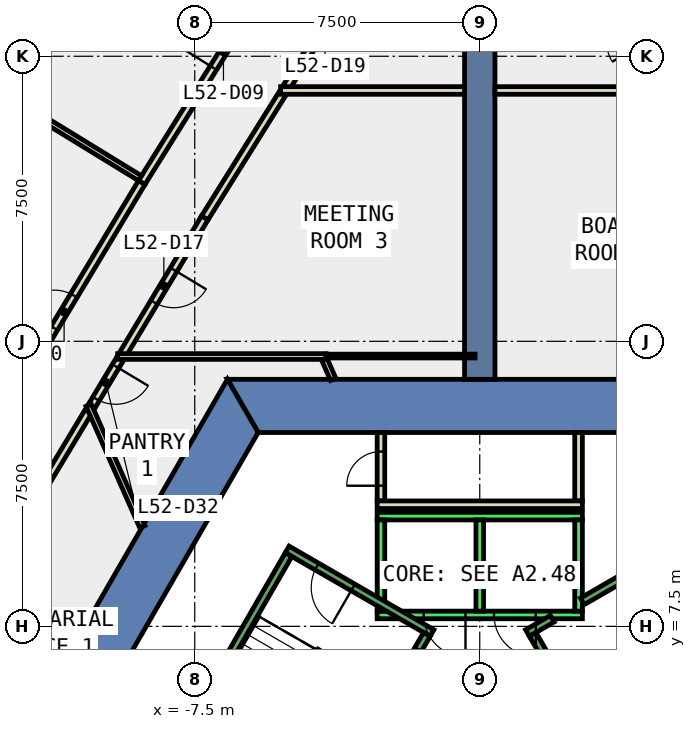
"""IFC4 building model, lengths in metres.
Left out: names, types, materials, properties, quantities, classifications, styles, units other than length and angle.
Written with IfcOpenShell. Run it as: python <this file> out.ifc"""

import sys

from ifc_helpers import new_model, si_unit, direction, frame, frame_2d, origin, place, context, subcontext, project, spatial, polyline, rectangle, outline, extrude, element, fill, save


model = new_model("IFC4")
c1 = context("Model", 3, precision=1e-05, world=origin(), true_north=direction((0.0, 1.0)))
c2 = subcontext(c1, "Body", "Model", "MODEL_VIEW")
j1 = project(units=[si_unit("LENGTHUNIT", "METRE"), si_unit("PLANEANGLEUNIT", "RADIAN")], contexts=[c1])
p1 = place(None, origin())
s1 = spatial("IfcSite", under=j1, at=p1, CompositionType="ELEMENT")
p2 = place(p1, origin())
s2 = spatial("IfcBuilding", under=s1, at=p2, CompositionType="ELEMENT")
p3 = place(p2, frame((0.0, 0.0, 231.8)))
s3 = spatial("IfcBuildingStorey", under=s2, at=p3, CompositionType="ELEMENT", Elevation=231.8)
p4 = place(p3, frame((0.0, 0.0, -0.4)))
e1 = element("IfcWall", 1, at=p4, inside=s3, PredefinedType="SHEAR", context=c2, shape_type="SweptSolid", body=[
    extrude(outline(polyline([(6.64, 14.0), (-6.64, 14.0), (-5.831, 12.6), (5.831, 12.6), (6.64, 14.0)])), origin(), (0.0, 0.0, 1.0), 4.0),
])
p5 = place(p3, frame((0.0, 0.0, -0.4)))
e2 = element("IfcWall", 2, at=p5, inside=s3, PredefinedType="SHEAR", context=c2, shape_type="SweptSolid", body=[
    extrude(outline(polyline([(-11.834, 5.002), (-10.622, 4.302), (-5.831, 12.6), (-6.64, 14.0), (-11.834, 5.002)])), origin(), (0.0, 0.0, 1.0), 4.0),
])
p6 = place(p3, frame((0.0, 14.0, -0.4), z_axis=(0.0, 0.0, 1.0), x_axis=(0.0, 1.0, 0.0)))
e3 = element("IfcWall", 3, at=p6, inside=s3, PredefinedType="SHEAR", context=c2, shape_type="SweptSolid", body=[
    extrude(rectangle(XDim=9.0, YDim=0.8, at=frame_2d((4.5, 0.0))), origin(), (0.0, 0.0, 1.0), 4.0),
])
p7 = place(p3, frame((-9.485, 28.893, 0.0), z_axis=(0.0, 0.0, 1.0), x_axis=(-0.530037467052, -0.847974223383, 0.0)))
e4 = element("IfcWall", 4, at=p7, inside=s3, PredefinedType="STANDARD", context=c2, shape_type="SweptSolid", body=[
    extrude(rectangle(XDim=7.405, YDim=0.3, at=frame_2d((3.702, 0.0))), origin(), (0.0, 0.0, 1.0), 3.6),
])
p8 = place(p7, frame((0.651, 0.0, 0.9)))
e5 = element("IfcOpeningElement", 5, at=p8, cuts=e4, PredefinedType="OPENING", context=c2, shape_type="SweptSolid", body=[
    extrude(rectangle(XDim=2.4, YDim=2.6, at=frame_2d((1.2, 1.3))), frame((0.0, 0.16, 0.0), z_axis=(0.0, -1.0, 0.0), x_axis=(1.0, 0.0, 0.0)), (0.0, 0.0, 1.0), 0.32),
])
p9 = place(p7, frame((4.354, 0.0, 0.9)))
e6 = element("IfcOpeningElement", 6, at=p9, cuts=e4, PredefinedType="OPENING", context=c2, shape_type="SweptSolid", body=[
    extrude(rectangle(XDim=2.4, YDim=2.6, at=frame_2d((1.2, 1.3))), frame((0.0, 0.16, 0.0), z_axis=(0.0, -1.0, 0.0), x_axis=(1.0, 0.0, 0.0)), (0.0, 0.0, 1.0), 0.32),
])
p10 = place(p3, frame((-9.466, 14.536, 0.0), z_axis=(0.0, 0.0, 1.0), x_axis=(-0.514545292, -0.857463201823, 0.0)))
e7 = element("IfcWall", 7, at=p10, inside=s3, PredefinedType="PARTITIONING", context=c2, shape_type="SweptSolid", body=[
    extrude(rectangle(XDim=1.449, YDim=0.2, at=frame_2d((0.725, 0.0))), origin(), (0.0, 0.0, 1.0), 3.6),
])
p11 = place(p10, frame((0.225, 0.0, 0.0)))
e8 = element("IfcOpeningElement", 8, at=p11, cuts=e7, PredefinedType="OPENING", context=c2, shape_type="SweptSolid", body=[
    extrude(rectangle(XDim=1.0, YDim=2.1, at=frame_2d((0.5, 1.05))), frame((0.0, 0.11, 0.0), z_axis=(0.0, -1.0, 0.0), x_axis=(1.0, 0.0, 0.0)), (0.0, 0.0, 1.0), 0.22),
])
p12 = place(p3, frame((-10.29, 13.164, 0.0), z_axis=(0.0, 0.0, 1.0), x_axis=(-0.514904735811, -0.857247404802, 0.0)))
e9 = element("IfcWall", 9, at=p12, inside=s3, PredefinedType="PARTITIONING", context=c2, shape_type="SweptSolid", body=[
    extrude(rectangle(XDim=2.194, YDim=0.2, at=frame_2d((1.097, 0.0))), origin(), (0.0, 0.0, 1.0), 3.6),
])
p13 = place(p3, frame((-5.193, 21.515, 0.0), z_axis=(0.0, 0.0, 1.0), x_axis=(-0.530175390862, -0.847887996686, 0.0)))
e10 = element("IfcWall", 10, at=p13, inside=s3, PredefinedType="PARTITIONING", context=c2, shape_type="SweptSolid", body=[
    extrude(rectangle(XDim=3.855, YDim=0.2, at=frame_2d((1.928, 0.0))), origin(), (0.0, 0.0, 1.0), 3.6),
])
p14 = place(p3, frame((-7.237, 18.246, 0.0), z_axis=(0.0, 0.0, 1.0), x_axis=(-0.514959644878, -0.857214421336, 0.0)))
e11 = element("IfcWall", 11, at=p14, inside=s3, PredefinedType="PARTITIONING", context=c2, shape_type="SweptSolid", body=[
    extrude(rectangle(XDim=4.179, YDim=0.2, at=frame_2d((2.089, 0.0))), origin(), (0.0, 0.0, 1.0), 3.6),
])
p15 = place(p14, frame((1.589, 0.0, 0.0)))
e12 = element("IfcOpeningElement", 12, at=p15, cuts=e11, PredefinedType="OPENING", context=c2, shape_type="SweptSolid", body=[
    extrude(rectangle(XDim=1.0, YDim=2.1, at=frame_2d((0.5, 1.05))), frame((0.0, 0.11, 0.0), z_axis=(0.0, -1.0, 0.0), x_axis=(1.0, 0.0, 0.0)), (0.0, 0.0, 1.0), 0.22),
])
p16 = place(p3, frame((5.087, 21.685, 0.0), z_axis=(0.0, 0.0, 1.0), x_axis=(-0.529998940003, 0.847998304005, 0.0)))
e13 = element("IfcWall", 13, at=p16, inside=s3, PredefinedType="PARTITIONING", context=c2, shape_type="SweptSolid", body=[
    extrude(rectangle(XDim=3.83, YDim=0.2, at=frame_2d((1.915, 0.0))), origin(), (0.0, 0.0, 1.0), 3.6),
])
p17 = place(p16, frame((1.416, 0.0, 0.0)))
e14 = element("IfcOpeningElement", 14, at=p17, cuts=e13, PredefinedType="OPENING", context=c2, shape_type="SweptSolid", body=[
    extrude(rectangle(XDim=1.0, YDim=2.1, at=frame_2d((0.5, 1.05))), frame((0.0, 0.11, 0.0), z_axis=(0.0, -1.0, 0.0), x_axis=(1.0, 0.0, 0.0)), (0.0, 0.0, 1.0), 0.22),
])
p18 = place(p3, frame((-3.057, 24.933, 0.0), z_axis=(0.0, 0.0, 1.0), x_axis=(-0.529998940003, -0.847998304005, 0.0)))
e15 = element("IfcWall", 15, at=p18, inside=s3, PredefinedType="PARTITIONING", context=c2, shape_type="SweptSolid", body=[
    extrude(rectangle(XDim=3.83, YDim=0.2, at=frame_2d((1.915, 0.0))), origin(), (0.0, 0.0, 1.0), 3.6),
])
p19 = place(p18, frame((1.416, 0.0, 0.0)))
e16 = element("IfcOpeningElement", 16, at=p19, cuts=e15, PredefinedType="OPENING", context=c2, shape_type="SweptSolid", body=[
    extrude(rectangle(XDim=1.0, YDim=2.1, at=frame_2d((0.5, 1.05))), frame((0.0, 0.11, 0.0), z_axis=(0.0, -1.0, 0.0), x_axis=(1.0, 0.0, 0.0)), (0.0, 0.0, 1.0), 0.22),
])
p20 = place(p3, frame((-8.896, 19.176, 0.0), z_axis=(0.0, 0.0, 1.0), x_axis=(0.529985425286, 0.848006750553, 0.0)))
e17 = element("IfcWall", 17, at=p20, inside=s3, PredefinedType="PARTITIONING", context=c2, shape_type="SweptSolid", body=[
    extrude(rectangle(XDim=8.119, YDim=0.2, at=frame_2d((4.06, 0.0))), origin(), (0.0, 0.0, 1.0), 3.6),
])
p21 = place(p20, frame((3.56, 0.0, 0.0)))
e18 = element("IfcOpeningElement", 18, at=p21, cuts=e17, PredefinedType="OPENING", context=c2, shape_type="SweptSolid", body=[
    extrude(rectangle(XDim=1.0, YDim=2.1, at=frame_2d((0.5, 1.05))), frame((0.0, 0.11, 0.0), z_axis=(0.0, -1.0, 0.0), x_axis=(1.0, 0.0, 0.0)), (0.0, 0.0, 1.0), 0.22),
])
p22 = place(p3, frame((-13.057, 12.247, 0.0), z_axis=(0.0, 0.0, 1.0), x_axis=(0.51490435266, 0.857247634941, 0.0)))
e19 = element("IfcWall", 19, at=p22, inside=s3, PredefinedType="PARTITIONING", context=c2, shape_type="SweptSolid", body=[
    extrude(rectangle(XDim=8.083, YDim=0.2, at=frame_2d((4.042, 0.0))), origin(), (0.0, 0.0, 1.0), 3.6),
])
p23 = place(p22, frame((3.616, 0.0, 0.0)))
e20 = element("IfcOpeningElement", 20, at=p23, cuts=e19, PredefinedType="OPENING", context=c2, shape_type="SweptSolid", body=[
    extrude(rectangle(XDim=1.0, YDim=2.1, at=frame_2d((0.5, 1.05))), frame((0.0, 0.11, 0.0), z_axis=(0.0, -1.0, 0.0), x_axis=(1.0, 0.0, 0.0)), (0.0, 0.0, 1.0), 0.22),
])
p24 = place(p3, frame((-2.6, 10.8, 0.0), z_axis=(0.0, 0.0, 1.0), x_axis=(0.0, 1.0, 0.0)))
e21 = element("IfcWall", 21, at=p24, inside=s3, PredefinedType="PARTITIONING", context=c2, shape_type="SweptSolid", body=[
    extrude(rectangle(XDim=1.8, YDim=0.2, at=frame_2d((0.9, 0.0))), origin(), (0.0, 0.0, 1.0), 3.6),
])
p25 = place(p24, frame((0.4, 0.0, 0.0)))
e22 = element("IfcOpeningElement", 22, at=p25, cuts=e21, PredefinedType="OPENING", context=c2, shape_type="SweptSolid", body=[
    extrude(rectangle(XDim=0.9, YDim=2.1, at=frame_2d((0.45, 1.05))), frame((0.0, 0.11, 0.0), z_axis=(0.0, -1.0, 0.0), x_axis=(1.0, 0.0, 0.0)), (0.0, 0.0, 1.0), 0.22),
])
p26 = place(p3, frame((2.6, 12.6, 0.0), z_axis=(0.0, 0.0, 1.0), x_axis=(0.0, -1.0, 0.0)))
e23 = element("IfcWall", 23, at=p26, inside=s3, PredefinedType="PARTITIONING", context=c2, shape_type="SweptSolid", body=[
    extrude(rectangle(XDim=1.8, YDim=0.2, at=frame_2d((0.9, 0.0))), origin(), (0.0, 0.0, 1.0), 3.6),
])
p27 = place(p3, frame((2.7, 10.7, 0.0), z_axis=(0.0, 0.0, 1.0), x_axis=(-1.0, 0.0, 0.0)))
e24 = element("IfcWall", 24, at=p27, inside=s3, PredefinedType="PARTITIONING", context=c2, shape_type="SweptSolid", body=[
    extrude(rectangle(XDim=5.4, YDim=0.2, at=frame_2d((2.7, 0.0))), origin(), (0.0, 0.0, 1.0), 3.6),
])
p28 = place(p3, frame((-8.879, 10.123, 0.0), z_axis=(0.0, 0.0, 1.0), x_axis=(-0.404271206787, 0.914639159102, 0.0)))
e25 = element("IfcWall", 25, at=p28, inside=s3, PredefinedType="PARTITIONING", context=c2, shape_type="SweptSolid", body=[
    extrude(rectangle(XDim=3.495, YDim=0.15, at=frame_2d((1.748, 0.0))), origin(), (0.0, 0.0, 1.0), 3.6),
])
p29 = place(p3, frame((-3.857, 14.0, 0.0), z_axis=(0.0, 0.0, 1.0), x_axis=(-0.403443407317, 0.915004599493, 0.0)))
e26 = element("IfcWall", 26, at=p29, inside=s3, PredefinedType="PARTITIONING", context=c2, shape_type="SweptSolid", body=[
    extrude(rectangle(XDim=0.58, YDim=0.15, at=frame_2d((0.29, 0.0))), origin(), (0.0, 0.0, 1.0), 3.6),
])
p30 = place(p3, frame((-4.047, 14.6, 0.0), z_axis=(0.0, 0.0, 1.0), x_axis=(-1.0, 0.0, 0.0)))
e27 = element("IfcWall", 27, at=p30, inside=s3, PredefinedType="PARTITIONING", context=c2, shape_type="SweptSolid", body=[
    extrude(rectangle(XDim=5.48, YDim=0.15, at=frame_2d((2.74, 0.0))), origin(), (0.0, 0.0, 1.0), 3.6),
])
p31 = place(p3, frame((-4.047, 14.612, 0.0), z_axis=(0.0, 0.0, 1.0), x_axis=(1.0, 0.0, 0.0)))
e28 = element("IfcWall", 28, at=p31, inside=s3, PredefinedType="PARTITIONING", context=c2, shape_type="SweptSolid", body=[
    extrude(rectangle(XDim=3.924, YDim=0.1, at=frame_2d((1.962, 0.0))), origin(), (0.0, 0.0, 1.0), 3.6),
])
for number, where, z_axis, x_axis in (
    (29, (0.4, 21.6, 0.0), (0.0, 0.0, 1.0), (1.0, 0.0, 0.0)),
    (30, (-5.24, 21.6, 0.0), (0.0, 0.0, 1.0), (1.0, 0.0, 0.0)),
):
    element("IfcWall", number, at=place(p3, frame(where, z_axis=z_axis, x_axis=x_axis)), inside=s3, PredefinedType="PARTITIONING", context=c2, shape_type="SweptSolid", body=[
        extrude(rectangle(XDim=4.84, YDim=0.2, at=frame_2d((2.42, 0.0))), origin(), (0.0, 0.0, 1.0), 3.6),
    ])
p32 = place(p3, frame((-8.942, 19.292, 0.0), z_axis=(0.0, 0.0, 1.0), x_axis=(-0.85273109234, 0.522350154739, 0.0)))
e31 = element("IfcWall", 31, at=p32, inside=s3, PredefinedType="PARTITIONING", context=c2, shape_type="SweptSolid", body=[
    extrude(rectangle(XDim=4.08, YDim=0.15, at=frame_2d((2.04, 0.0))), origin(), (0.0, 0.0, 1.0), 3.6),
])
p33 = place(p3, frame((2.7, 7.8, 0.0), z_axis=(0.0, 0.0, 1.0), x_axis=(-1.0, 0.0, 0.0)))
e32 = element("IfcWall", 32, at=p33, inside=s3, PredefinedType="STANDARD", context=c2, shape_type="SweptSolid", body=[
    extrude(rectangle(XDim=5.4, YDim=0.2, at=frame_2d((2.7, 0.0))), origin(), (0.0, 0.0, 1.0), 3.6),
])
p34 = place(p33, frame((1.225, 0.0, 0.0)))
e33 = element("IfcOpeningElement", 33, at=p34, cuts=e32, PredefinedType="OPENING", context=c2, shape_type="SweptSolid", body=[
    extrude(rectangle(XDim=1.1, YDim=2.1, at=frame_2d((0.55, 1.05))), frame((0.0, 0.11, 0.0), z_axis=(0.0, -1.0, 0.0), x_axis=(1.0, 0.0, 0.0)), (0.0, 0.0, 1.0), 0.22),
])
p35 = place(p33, frame((3.075, 0.0, 0.0)))
e34 = element("IfcOpeningElement", 34, at=p35, cuts=e32, PredefinedType="OPENING", context=c2, shape_type="SweptSolid", body=[
    extrude(rectangle(XDim=1.1, YDim=2.1, at=frame_2d((0.55, 1.05))), frame((0.0, 0.11, 0.0), z_axis=(0.0, -1.0, 0.0), x_axis=(1.0, 0.0, 0.0)), (0.0, 0.0, 1.0), 0.22),
])
p36 = place(p3, frame((2.7, 10.4, 0.0), z_axis=(0.0, 0.0, 1.0), x_axis=(-1.0, 0.0, 0.0)))
e35 = element("IfcWall", 35, at=p36, inside=s3, PredefinedType="STANDARD", context=c2, shape_type="SweptSolid", body=[
    extrude(rectangle(XDim=5.4, YDim=0.2, at=frame_2d((2.7, 0.0))), origin(), (0.0, 0.0, 1.0), 3.6),
])
for number, where, z_axis, x_axis in (
    (36, (2.6, 7.9, 0.0), (0.0, 0.0, 1.0), (0.0, 1.0, 0.0)),
    (37, (0.0, 7.9, 0.0), (0.0, 0.0, 1.0), (0.0, 1.0, 0.0)),
    (38, (-2.6, 7.9, 0.0), (0.0, 0.0, 1.0), (0.0, 1.0, 0.0)),
):
    element("IfcWall", number, at=place(p3, frame(where, z_axis=z_axis, x_axis=x_axis)), inside=s3, PredefinedType="STANDARD", context=c2, shape_type="SweptSolid", body=[
        extrude(rectangle(XDim=2.4, YDim=0.2, at=frame_2d((1.2, 0.0))), origin(), (0.0, 0.0, 1.0), 3.6),
    ])
p37 = place(p3, frame((2.7, 8.158, 0.0), z_axis=(0.0, 0.0, 1.0), x_axis=(0.86611865017, 0.499838457731, 0.0)))
e39 = element("IfcWall", 39, at=p37, inside=s3, PredefinedType="STANDARD", context=c2, shape_type="SweptSolid", body=[
    extrude(rectangle(XDim=2.733, YDim=0.2, at=frame_2d((1.366, 0.0))), origin(), (0.0, 0.0, 1.0), 3.6),
])
p38 = place(p3, frame((1.256, 7.324, 0.0), z_axis=(0.0, 0.0, 1.0), x_axis=(0.865915093549, 0.500191014278, 0.0)))
e40 = element("IfcWall", 40, at=p38, inside=s3, PredefinedType="STANDARD", context=c2, shape_type="SweptSolid", body=[
    extrude(rectangle(XDim=0.752, YDim=0.2, at=frame_2d((0.376, 0.0))), origin(), (0.0, 0.0, 1.0), 3.6),
])
p39 = place(p3, frame((4.843, 1.312, 0.0), z_axis=(0.0, 0.0, 1.0), x_axis=(-0.499963383562, 0.866046543262, 0.0)))
e41 = element("IfcWall", 41, at=p39, inside=s3, PredefinedType="STANDARD", context=c2, shape_type="SweptSolid", body=[
    extrude(rectangle(XDim=6.9, YDim=0.2, at=frame_2d((3.45, 0.0))), origin(), (0.0, 0.0, 1.0), 3.6),
])
p40 = place(p39, frame((0.45, 0.0, 0.0)))
e42 = element("IfcOpeningElement", 42, at=p40, cuts=e41, PredefinedType="OPENING", context=c2, shape_type="SweptSolid", body=[
    extrude(rectangle(XDim=1.1, YDim=2.2, at=frame_2d((0.55, 1.1))), frame((0.0, 0.11, 0.0), z_axis=(0.0, -1.0, 0.0), x_axis=(1.0, 0.0, 0.0)), (0.0, 0.0, 1.0), 0.22),
])
p41 = place(p3, frame((-1.256, 7.324, 0.0), z_axis=(0.0, 0.0, 1.0), x_axis=(-0.866046073146, 0.499964197906, 0.0)))
e43 = element("IfcWall", 43, at=p41, inside=s3, PredefinedType="STANDARD", context=c2, shape_type="SweptSolid", body=[
    extrude(rectangle(XDim=4.4, YDim=0.2, at=frame_2d((2.2, 0.0))), origin(), (0.0, 0.0, 1.0), 3.6),
])
p42 = place(p41, frame((2.4, 0.0, 0.0)))
e44 = element("IfcOpeningElement", 44, at=p42, cuts=e43, PredefinedType="OPENING", context=c2, shape_type="SweptSolid", body=[
    extrude(rectangle(XDim=1.1, YDim=2.2, at=frame_2d((0.55, 1.1))), frame((0.0, 0.11, 0.0), z_axis=(0.0, -1.0, 0.0), x_axis=(1.0, 0.0, 0.0)), (0.0, 0.0, 1.0), 0.22),
])
p43 = place(p3, frame((-1.393, 7.288, 0.0), z_axis=(0.0, 0.0, 1.0), x_axis=(-0.499963383562, -0.866046543262, 0.0)))
e45 = element("IfcWall", 45, at=p43, inside=s3, PredefinedType="STANDARD", context=c2, shape_type="SweptSolid", body=[
    extrude(rectangle(XDim=6.9, YDim=0.2, at=frame_2d((3.45, 0.0))), origin(), (0.0, 0.0, 1.0), 3.6),
])
p44 = place(p43, frame((0.45, 0.0, 0.0)))
e46 = element("IfcOpeningElement", 46, at=p44, cuts=e45, PredefinedType="OPENING", context=c2, shape_type="SweptSolid", body=[
    extrude(rectangle(XDim=1.1, YDim=2.2, at=frame_2d((0.55, 1.1))), frame((0.0, 0.11, 0.0), z_axis=(0.0, -1.0, 0.0), x_axis=(1.0, 0.0, 0.0)), (0.0, 0.0, 1.0), 0.22),
])
p45 = place(p3, frame((-5.03, 9.388, 0.0), z_axis=(0.0, 0.0, 1.0), x_axis=(-0.499978703459, -0.866037698999, 0.0)))
e47 = element("IfcWall", 47, at=p45, inside=s3, PredefinedType="STANDARD", context=c2, shape_type="SweptSolid", body=[
    extrude(rectangle(XDim=6.9, YDim=0.2, at=frame_2d((3.45, 0.0))), origin(), (0.0, 0.0, 1.0), 3.6),
])
p46 = place(p21, origin())
e48 = element("IfcDoor", 48, at=p46, inside=s3, OperationType="SINGLE_SWING_LEFT", PredefinedType="DOOR", context=c2, shape_type="SweptSolid", body=[
    extrude(rectangle(XDim=1.0, YDim=2.1, at=frame_2d((0.5, 1.05))), frame((0.0, 0.025, 0.0), z_axis=(0.0, -1.0, 0.0), x_axis=(1.0, 0.0, 0.0)), (0.0, 0.0, 1.0), 0.05),
])
fill(e18, e48)
p47 = place(p23, origin())
e49 = element("IfcDoor", 49, at=p47, inside=s3, OperationType="SINGLE_SWING_RIGHT", PredefinedType="DOOR", context=c2, shape_type="SweptSolid", body=[
    extrude(rectangle(XDim=1.0, YDim=2.1, at=frame_2d((0.5, 1.05))), frame((0.0, 0.025, 0.0), z_axis=(0.0, -1.0, 0.0), x_axis=(1.0, 0.0, 0.0)), (0.0, 0.0, 1.0), 0.05),
])
fill(e20, e49)
p48 = place(p15, origin())
e50 = element("IfcDoor", 50, at=p48, inside=s3, OperationType="SINGLE_SWING_LEFT", PredefinedType="DOOR", context=c2, shape_type="SweptSolid", body=[
    extrude(rectangle(XDim=1.0, YDim=2.1, at=frame_2d((0.5, 1.05))), frame((0.0, 0.025, 0.0), z_axis=(0.0, -1.0, 0.0), x_axis=(1.0, 0.0, 0.0)), (0.0, 0.0, 1.0), 0.05),
])
fill(e12, e50)
p49 = place(p25, origin())
e51 = element("IfcDoor", 51, at=p49, inside=s3, OperationType="SINGLE_SWING_RIGHT", PredefinedType="DOOR", context=c2, shape_type="SweptSolid", body=[
    extrude(rectangle(XDim=0.9, YDim=2.1, at=frame_2d((0.45, 1.05))), frame((0.0, 0.025, 0.0), z_axis=(0.0, -1.0, 0.0), x_axis=(1.0, 0.0, 0.0)), (0.0, 0.0, 1.0), 0.05),
])
fill(e22, e51)
p50 = place(p11, origin())
e52 = element("IfcDoor", 52, at=p50, inside=s3, OperationType="SINGLE_SWING_RIGHT", PredefinedType="DOOR", context=c2, shape_type="SweptSolid", body=[
    extrude(rectangle(XDim=1.0, YDim=2.1, at=frame_2d((0.5, 1.05))), frame((0.0, 0.025, 0.0), z_axis=(0.0, -1.0, 0.0), x_axis=(1.0, 0.0, 0.0)), (0.0, 0.0, 1.0), 0.05),
])
fill(e8, e52)
p51 = place(p34, origin())
e53 = element("IfcDoor", 53, at=p51, inside=s3, OperationType="SLIDING_TO_LEFT", PredefinedType="DOOR", context=c2, shape_type="SweptSolid", body=[
    extrude(rectangle(XDim=1.1, YDim=2.1, at=frame_2d((0.55, 1.05))), frame((0.0, 0.025, 0.0), z_axis=(0.0, -1.0, 0.0), x_axis=(1.0, 0.0, 0.0)), (0.0, 0.0, 1.0), 0.05),
])
fill(e33, e53)
p52 = place(p35, origin())
e54 = element("IfcDoor", 54, at=p52, inside=s3, OperationType="SLIDING_TO_LEFT", PredefinedType="DOOR", context=c2, shape_type="SweptSolid", body=[
    extrude(rectangle(XDim=1.1, YDim=2.1, at=frame_2d((0.55, 1.05))), frame((0.0, 0.025, 0.0), z_axis=(0.0, -1.0, 0.0), x_axis=(1.0, 0.0, 0.0)), (0.0, 0.0, 1.0), 0.05),
])
fill(e34, e54)
p53 = place(p44, origin())
e55 = element("IfcDoor", 55, at=p53, inside=s3, OperationType="SINGLE_SWING_LEFT", PredefinedType="DOOR", context=c2, shape_type="SweptSolid", body=[
    extrude(rectangle(XDim=1.1, YDim=2.2, at=frame_2d((0.55, 1.1))), frame((0.0, 0.025, 0.0), z_axis=(0.0, -1.0, 0.0), x_axis=(1.0, 0.0, 0.0)), (0.0, 0.0, 1.0), 0.05),
])
fill(e46, e55)
p54 = place(p42, origin())
e56 = element("IfcDoor", 56, at=p54, inside=s3, OperationType="SINGLE_SWING_LEFT", PredefinedType="DOOR", context=c2, shape_type="SweptSolid", body=[
    extrude(rectangle(XDim=1.1, YDim=2.2, at=frame_2d((0.55, 1.1))), frame((0.0, 0.025, 0.0), z_axis=(0.0, -1.0, 0.0), x_axis=(1.0, 0.0, 0.0)), (0.0, 0.0, 1.0), 0.05),
])
fill(e44, e56)
save(model, sys.argv[1])
